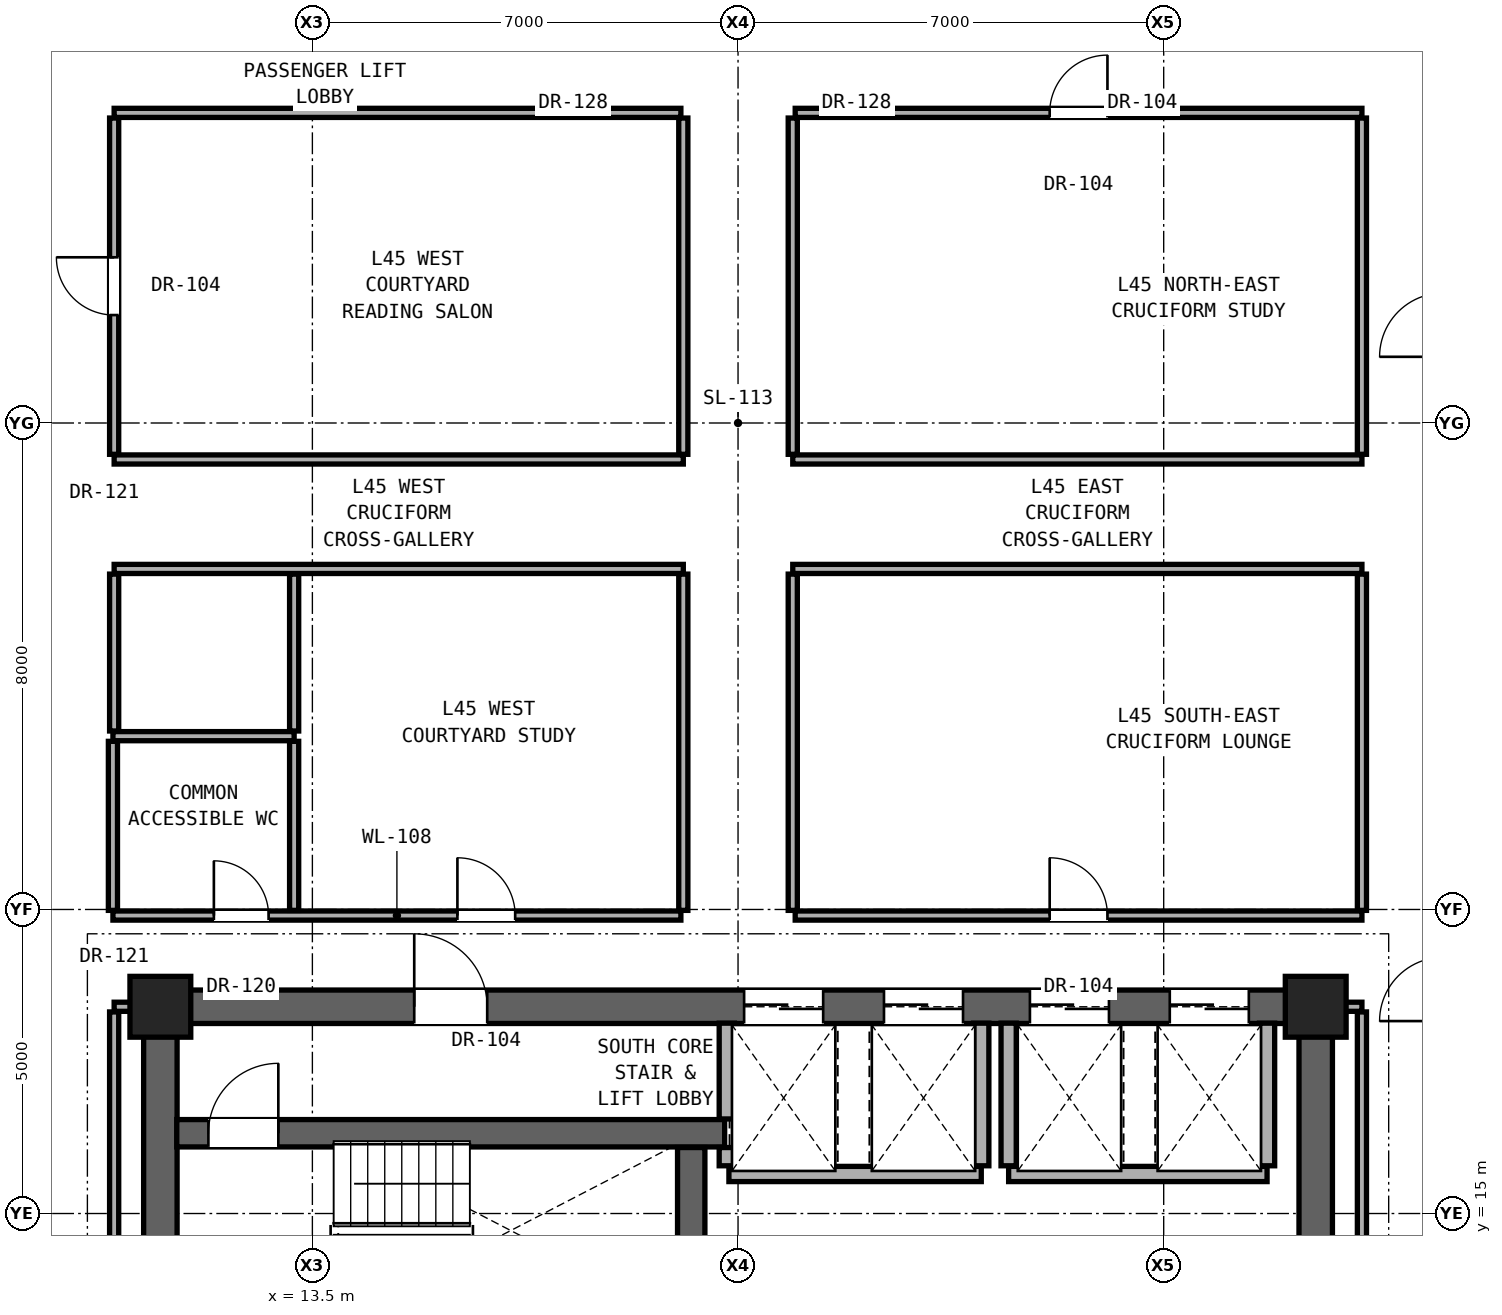
"""IFC4 building model, lengths in metres.
Left out: names, types, materials, properties, quantities, classifications, styles, units other than length and angle.
Written with IfcOpenShell. Run it as: python <this file> out.ifc"""

import sys

from ifc_helpers import new_model, si_unit, direction, frame, frame_2d, origin, origin_2d, place, context, subcontext, project, spatial, rectangle, extrude, element, fill, save


model = new_model("IFC4")
c1 = context("Model", 3, precision=1e-05, world=origin(), true_north=direction((0.0, 1.0)))
c2 = subcontext(c1, "Body", "Model", "MODEL_VIEW")
j1 = project(units=[si_unit("LENGTHUNIT", "METRE"), si_unit("PLANEANGLEUNIT", "RADIAN")], contexts=[c1])
p1 = place(None, origin())
s1 = spatial("IfcSite", under=j1, at=p1, CompositionType="ELEMENT")
p2 = place(p1, origin())
s2 = spatial("IfcBuilding", under=s1, at=p2, CompositionType="ELEMENT")
p3 = place(p2, frame((0.0, 0.0, 160.9)))
s3 = spatial("IfcBuildingStorey", under=s2, at=p3, CompositionType="ELEMENT", Elevation=160.9)
for number, where, z_axis, x_axis in (
    (1, (11.0, 18.4, 0.0), (0.0, 0.0, 1.0), (1.0, 0.0, 0.0)),
    (2, (30.0, 18.4, 0.0), (0.0, 0.0, 1.0), (1.0, 0.0, 0.0)),
):
    element("IfcColumn", number, at=place(p3, frame(where, z_axis=z_axis, x_axis=x_axis)), inside=s3, PredefinedType="COLUMN", context=c2, shape_type="SweptSolid", body=[
        extrude(rectangle(XDim=1.0, YDim=1.0, at=origin_2d()), origin(), (0.0, 0.0, 1.0), 3.25),
    ])
for number, where, z_axis, x_axis in (
    (3, (11.0, 12.4, 0.0), (0.0, 0.0, 1.0), (0.0, 1.0, 0.0)),
    (4, (30.0, 12.4, 0.0), (0.0, 0.0, 1.0), (0.0, 1.0, 0.0)),
):
    element("IfcWall", number, at=place(p3, frame(where, z_axis=z_axis, x_axis=x_axis)), inside=s3, PredefinedType="SHEAR", context=c2, shape_type="SweptSolid", body=[
        extrude(rectangle(XDim=6.0, YDim=0.55, at=frame_2d((3.0, 0.0))), origin(), (0.0, 0.0, 1.0), 3.05),
    ])
p4 = place(p3, frame((11.0, 18.4, 0.0), z_axis=(0.0, 0.0, 1.0), x_axis=(1.0, 0.0, 0.0)))
e5 = element("IfcWall", 5, at=p4, inside=s3, PredefinedType="SHEAR", context=c2, shape_type="SweptSolid", body=[
    extrude(rectangle(XDim=19.0, YDim=0.55, at=frame_2d((9.5, 0.0))), origin(), (0.0, 0.0, 1.0), 3.05),
])
p5 = place(p4, frame((4.175, 0.0, 0.0)))
e6 = element("IfcOpeningElement", 6, at=p5, cuts=e5, PredefinedType="OPENING", context=c2, shape_type="SweptSolid", body=[
    extrude(rectangle(XDim=1.2, YDim=2.25, at=frame_2d((0.6, 1.125))), frame((0.0, 0.285, 0.0), z_axis=(0.0, -1.0, 0.0), x_axis=(1.0, 0.0, 0.0)), (0.0, 0.0, 1.0), 0.57),
])
p6 = place(p4, frame((9.6, 0.0, 0.0)))
e7 = element("IfcOpeningElement", 7, at=p6, cuts=e5, PredefinedType="OPENING", context=c2, shape_type="SweptSolid", body=[
    extrude(rectangle(XDim=1.3, YDim=2.3, at=frame_2d((0.65, 1.15))), frame((0.0, 0.285, 0.0), z_axis=(0.0, -1.0, 0.0), x_axis=(1.0, 0.0, 0.0)), (0.0, 0.0, 1.0), 0.57),
])
p7 = place(p4, frame((11.9, 0.0, 0.0)))
e8 = element("IfcOpeningElement", 8, at=p7, cuts=e5, PredefinedType="OPENING", context=c2, shape_type="SweptSolid", body=[
    extrude(rectangle(XDim=1.3, YDim=2.3, at=frame_2d((0.65, 1.15))), frame((0.0, 0.285, 0.0), z_axis=(0.0, -1.0, 0.0), x_axis=(1.0, 0.0, 0.0)), (0.0, 0.0, 1.0), 0.57),
])
p8 = place(p4, frame((14.3, 0.0, 0.0)))
e9 = element("IfcOpeningElement", 9, at=p8, cuts=e5, PredefinedType="OPENING", context=c2, shape_type="SweptSolid", body=[
    extrude(rectangle(XDim=1.3, YDim=2.3, at=frame_2d((0.65, 1.15))), frame((0.0, 0.285, 0.0), z_axis=(0.0, -1.0, 0.0), x_axis=(1.0, 0.0, 0.0)), (0.0, 0.0, 1.0), 0.57),
])
p9 = place(p4, frame((16.6, 0.0, 0.0)))
e10 = element("IfcOpeningElement", 10, at=p9, cuts=e5, PredefinedType="OPENING", context=c2, shape_type="SweptSolid", body=[
    extrude(rectangle(XDim=1.3, YDim=2.3, at=frame_2d((0.65, 1.15))), frame((0.0, 0.285, 0.0), z_axis=(0.0, -1.0, 0.0), x_axis=(1.0, 0.0, 0.0)), (0.0, 0.0, 1.0), 0.57),
])
p10 = place(p3, frame((20.35, 15.65, 0.0), z_axis=(0.0, 0.0, 1.0), x_axis=(1.0, 0.0, 0.0)))
e11 = element("IfcWall", 11, at=p10, inside=s3, PredefinedType="SOLIDWALL", context=c2, shape_type="SweptSolid", body=[
    extrude(rectangle(XDim=4.15, YDim=0.25, at=frame_2d((2.075, 0.0))), origin(), (0.0, 0.0, 1.0), 3.05),
])
p11 = place(p3, frame((24.95, 15.65, 0.0), z_axis=(0.0, 0.0, 1.0), x_axis=(1.0, 0.0, 0.0)))
e12 = element("IfcWall", 12, at=p11, inside=s3, PredefinedType="SOLIDWALL", context=c2, shape_type="SweptSolid", body=[
    extrude(rectangle(XDim=4.25, YDim=0.25, at=frame_2d((2.125, 0.0))), origin(), (0.0, 0.0, 1.0), 3.05),
])
p12 = place(p3, frame((11.27, 16.32, 0.0), z_axis=(0.0, 0.0, 1.0), x_axis=(1.0, 0.0, 0.0)))
e13 = element("IfcWall", 13, at=p12, inside=s3, PredefinedType="SHEAR", context=c2, shape_type="SweptSolid", body=[
    extrude(rectangle(XDim=9.01, YDim=0.45, at=frame_2d((4.505, 0.0))), origin(), (0.0, 0.0, 1.0), 3.05),
])
p13 = place(p12, frame((0.52, 0.0, 0.0)))
e14 = element("IfcOpeningElement", 14, at=p13, cuts=e13, PredefinedType="OPENING", context=c2, shape_type="SweptSolid", body=[
    extrude(rectangle(XDim=1.15, YDim=2.2, at=frame_2d((0.575, 1.1))), frame((0.0, 0.235, 0.0), z_axis=(0.0, -1.0, 0.0), x_axis=(1.0, 0.0, 0.0)), (0.0, 0.0, 1.0), 0.47),
])
for number, where, z_axis, x_axis in (
    (15, (10.24, 18.4, 0.0), (0.0, 0.0, 1.0), (1.0, 0.0, 0.0)),
    (16, (30.27, 18.4, 0.0), (0.0, 0.0, 1.0), (1.0, 0.0, 0.0)),
):
    element("IfcWall", number, at=place(p3, frame(where, z_axis=z_axis, x_axis=x_axis)), inside=s3, PredefinedType="PARTITIONING", context=c2, shape_type="SweptSolid", body=[
        extrude(rectangle(XDim=0.49, YDim=0.15, at=frame_2d((0.245, 0.0))), origin(), (0.0, 0.0, 1.0), 2.442),
    ])
p14 = place(p3, frame((10.22, 19.9, 0.0), z_axis=(0.0, 0.0, 1.0), x_axis=(1.0, 0.0, 0.0)))
e17 = element("IfcWall", 17, at=p14, inside=s3, PredefinedType="PARTITIONING", context=c2, shape_type="SweptSolid", body=[
    extrude(rectangle(XDim=9.34, YDim=0.15, at=frame_2d((4.67, 0.0))), origin(), (0.0, 0.0, 1.0), 2.186),
])
p15 = place(p14, frame((1.66, 0.0, 0.0)))
e18 = element("IfcOpeningElement", 18, at=p15, cuts=e17, PredefinedType="OPENING", context=c2, shape_type="SweptSolid", body=[
    extrude(rectangle(XDim=0.9, YDim=2.1, at=frame_2d((0.45, 1.05))), frame((0.0, 0.085, 0.0), z_axis=(0.0, -1.0, 0.0), x_axis=(1.0, 0.0, 0.0)), (0.0, 0.0, 1.0), 0.17),
])
p16 = place(p14, frame((5.665, 0.0, 0.0)))
e19 = element("IfcOpeningElement", 19, at=p16, cuts=e17, PredefinedType="OPENING", context=c2, shape_type="SweptSolid", body=[
    extrude(rectangle(XDim=0.95, YDim=2.15, at=frame_2d((0.475, 1.075))), frame((0.0, 0.085, 0.0), z_axis=(0.0, -1.0, 0.0), x_axis=(1.0, 0.0, 0.0)), (0.0, 0.0, 1.0), 0.17),
])
p17 = place(p3, frame((21.44, 19.9, 0.0), z_axis=(0.0, 0.0, 1.0), x_axis=(1.0, 0.0, 0.0)))
e20 = element("IfcWall", 20, at=p17, inside=s3, PredefinedType="PARTITIONING", context=c2, shape_type="SweptSolid", body=[
    extrude(rectangle(XDim=9.32, YDim=0.15, at=frame_2d((4.66, 0.0))), origin(), (0.0, 0.0, 1.0), 2.186),
])
p18 = place(p17, frame((4.185, 0.0, 0.0)))
e21 = element("IfcOpeningElement", 21, at=p18, cuts=e20, PredefinedType="OPENING", context=c2, shape_type="SweptSolid", body=[
    extrude(rectangle(XDim=0.95, YDim=2.15, at=frame_2d((0.475, 1.075))), frame((0.0, 0.085, 0.0), z_axis=(0.0, -1.0, 0.0), x_axis=(1.0, 0.0, 0.0)), (0.0, 0.0, 1.0), 0.17),
])
p19 = place(p3, frame((10.22, 22.85, 0.0), z_axis=(0.0, 0.0, 1.0), x_axis=(1.0, 0.0, 0.0)))
e22 = element("IfcWall", 22, at=p19, inside=s3, PredefinedType="PARTITIONING", context=c2, shape_type="SweptSolid", body=[
    extrude(rectangle(XDim=2.98, YDim=0.15, at=frame_2d((1.49, 0.0))), origin(), (0.0, 0.0, 1.0), 2.186),
])
for number, where, z_axis, x_axis in (
    (23, (10.24, 25.6, 0.0), (0.0, 0.0, 1.0), (1.0, 0.0, 0.0)),
    (24, (21.4, 25.6, 0.0), (0.0, 0.0, 1.0), (1.0, 0.0, 0.0)),
    (25, (10.24, 27.4, 0.0), (0.0, 0.0, 1.0), (1.0, 0.0, 0.0)),
    (26, (21.4, 27.4, 0.0), (0.0, 0.0, 1.0), (1.0, 0.0, 0.0)),
):
    element("IfcWall", number, at=place(p3, frame(where, z_axis=z_axis, x_axis=x_axis)), inside=s3, PredefinedType="PARTITIONING", context=c2, shape_type="SweptSolid", body=[
        extrude(rectangle(XDim=9.36, YDim=0.15, at=frame_2d((4.68, 0.0))), origin(), (0.0, 0.0, 1.0), 2.186),
    ])
p20 = place(p3, frame((10.24, 33.1, 0.0), z_axis=(0.0, 0.0, 1.0), x_axis=(1.0, 0.0, 0.0)))
e27 = element("IfcWall", 27, at=p20, inside=s3, PredefinedType="PARTITIONING", context=c2, shape_type="SweptSolid", body=[
    extrude(rectangle(XDim=9.32, YDim=0.15, at=frame_2d((4.66, 0.0))), origin(), (0.0, 0.0, 1.0), 2.186),
])
p21 = place(p3, frame((21.44, 33.1, 0.0), z_axis=(0.0, 0.0, 1.0), x_axis=(1.0, 0.0, 0.0)))
e28 = element("IfcWall", 28, at=p21, inside=s3, PredefinedType="PARTITIONING", context=c2, shape_type="SweptSolid", body=[
    extrude(rectangle(XDim=9.32, YDim=0.15, at=frame_2d((4.66, 0.0))), origin(), (0.0, 0.0, 1.0), 2.186),
])
p22 = place(p21, frame((4.185, 0.0, 0.0)))
e29 = element("IfcOpeningElement", 29, at=p22, cuts=e28, PredefinedType="OPENING", context=c2, shape_type="SweptSolid", body=[
    extrude(rectangle(XDim=0.95, YDim=2.15, at=frame_2d((0.475, 1.075))), frame((0.0, 0.085, 0.0), z_axis=(0.0, -1.0, 0.0), x_axis=(1.0, 0.0, 0.0)), (0.0, 0.0, 1.0), 0.17),
])
p23 = place(p3, frame((10.22, 19.985, 0.0), z_axis=(0.0, 0.0, 1.0), x_axis=(0.0, 1.0, 0.0)))
e30 = element("IfcWall", 30, at=p23, inside=s3, PredefinedType="PARTITIONING", context=c2, shape_type="SweptSolid", body=[
    extrude(rectangle(XDim=2.78, YDim=0.15, at=frame_2d((1.39, 0.0))), origin(), (0.0, 0.0, 1.0), 3.05),
])
p24 = place(p3, frame((10.24, 12.335, 0.0), z_axis=(0.0, 0.0, 1.0), x_axis=(0.0, 1.0, 0.0)))
e31 = element("IfcWall", 31, at=p24, inside=s3, PredefinedType="PARTITIONING", context=c2, shape_type="SweptSolid", body=[
    extrude(rectangle(XDim=5.98, YDim=0.15, at=frame_2d((2.99, 0.0))), origin(), (0.0, 0.0, 1.0), 2.442),
])
p25 = place(p3, frame((10.24, 22.935, 0.0), z_axis=(0.0, 0.0, 1.0), x_axis=(0.0, 1.0, 0.0)))
e32 = element("IfcWall", 32, at=p25, inside=s3, PredefinedType="PARTITIONING", context=c2, shape_type="SweptSolid", body=[
    extrude(rectangle(XDim=2.58, YDim=0.15, at=frame_2d((1.29, 0.0))), origin(), (0.0, 0.0, 1.0), 2.346),
])
p26 = place(p3, frame((10.24, 27.485, 0.0), z_axis=(0.0, 0.0, 1.0), x_axis=(0.0, 1.0, 0.0)))
e33 = element("IfcWall", 33, at=p26, inside=s3, PredefinedType="PARTITIONING", context=c2, shape_type="SweptSolid", body=[
    extrude(rectangle(XDim=5.53, YDim=0.15, at=frame_2d((2.765, 0.0))), origin(), (0.0, 0.0, 1.0), 2.346),
])
p27 = place(p26, frame((2.29, 0.0, 0.0)))
e34 = element("IfcOpeningElement", 34, at=p27, cuts=e33, PredefinedType="OPENING", context=c2, shape_type="SweptSolid", body=[
    extrude(rectangle(XDim=0.95, YDim=2.15, at=frame_2d((0.475, 1.075))), frame((0.0, 0.085, 0.0), z_axis=(0.0, -1.0, 0.0), x_axis=(1.0, 0.0, 0.0)), (0.0, 0.0, 1.0), 0.17),
])
p28 = place(p3, frame((13.2, 19.985, 0.0), z_axis=(0.0, 0.0, 1.0), x_axis=(0.0, 1.0, 0.0)))
e35 = element("IfcWall", 35, at=p28, inside=s3, PredefinedType="PARTITIONING", context=c2, shape_type="SweptSolid", body=[
    extrude(rectangle(XDim=2.78, YDim=0.15, at=frame_2d((1.39, 0.0))), origin(), (0.0, 0.0, 1.0), 3.05),
])
p29 = place(p3, frame((13.2, 22.935, 0.0), z_axis=(0.0, 0.0, 1.0), x_axis=(0.0, 1.0, 0.0)))
e36 = element("IfcWall", 36, at=p29, inside=s3, PredefinedType="PARTITIONING", context=c2, shape_type="SweptSolid", body=[
    extrude(rectangle(XDim=2.58, YDim=0.15, at=frame_2d((1.29, 0.0))), origin(), (0.0, 0.0, 1.0), 2.186),
])
for number, where, z_axis, x_axis in (
    (37, (19.6, 19.985, 0.0), (0.0, 0.0, 1.0), (0.0, 1.0, 0.0)),
    (38, (19.6, 27.485, 0.0), (0.0, 0.0, 1.0), (0.0, 1.0, 0.0)),
):
    element("IfcWall", number, at=place(p3, frame(where, z_axis=z_axis, x_axis=x_axis)), inside=s3, PredefinedType="PARTITIONING", context=c2, shape_type="SweptSolid", body=[
        extrude(rectangle(XDim=5.53, YDim=0.15, at=frame_2d((2.765, 0.0))), origin(), (0.0, 0.0, 1.0), 2.186),
    ])
p30 = place(p3, frame((19.73, 13.355, 0.0), z_axis=(0.0, 0.0, 1.0), x_axis=(0.0, 1.0, 0.0)))
e39 = element("IfcWall", 39, at=p30, inside=s3, PredefinedType="SHEAR", context=c2, shape_type="SweptSolid", body=[
    extrude(rectangle(XDim=2.73, YDim=0.45, at=frame_2d((1.365, 0.0))), origin(), (0.0, 0.0, 1.0), 3.05),
])
p31 = place(p3, frame((20.315, 15.785, 0.0), z_axis=(0.0, 0.0, 1.0), x_axis=(0.0, 1.0, 0.0)))
e40 = element("IfcWall", 40, at=p31, inside=s3, PredefinedType="SOLIDWALL", context=c2, shape_type="SweptSolid", body=[
    extrude(rectangle(XDim=0.3, YDim=0.25, at=frame_2d((0.15, 0.0))), origin(), (0.0, 0.0, 1.0), 3.05),
])
p32 = place(p3, frame((20.315, 16.555, 0.0), z_axis=(0.0, 0.0, 1.0), x_axis=(0.0, 1.0, 0.0)))
e41 = element("IfcWall", 41, at=p32, inside=s3, PredefinedType="SOLIDWALL", context=c2, shape_type="SweptSolid", body=[
    extrude(rectangle(XDim=1.575, YDim=0.25, at=frame_2d((0.788, 0.0))), origin(), (0.0, 0.0, 1.0), 3.05),
])
for number, where, z_axis, x_axis in (
    (42, (21.4, 19.985, 0.0), (0.0, 0.0, 1.0), (0.0, 1.0, 0.0)),
    (43, (21.4, 27.485, 0.0), (0.0, 0.0, 1.0), (0.0, 1.0, 0.0)),
):
    element("IfcWall", number, at=place(p3, frame(where, z_axis=z_axis, x_axis=x_axis)), inside=s3, PredefinedType="PARTITIONING", context=c2, shape_type="SweptSolid", body=[
        extrude(rectangle(XDim=5.53, YDim=0.15, at=frame_2d((2.765, 0.0))), origin(), (0.0, 0.0, 1.0), 2.186),
    ])
for number, where, z_axis, x_axis in (
    (44, (24.5, 15.785, 0.0), (0.0, 0.0, 1.0), (0.0, 1.0, 0.0)),
    (45, (24.95, 15.785, 0.0), (0.0, 0.0, 1.0), (0.0, 1.0, 0.0)),
    (46, (29.2, 15.785, 0.0), (0.0, 0.0, 1.0), (0.0, 1.0, 0.0)),
):
    element("IfcWall", number, at=place(p3, frame(where, z_axis=z_axis, x_axis=x_axis)), inside=s3, PredefinedType="SOLIDWALL", context=c2, shape_type="SweptSolid", body=[
        extrude(rectangle(XDim=2.345, YDim=0.25, at=frame_2d((1.172, 0.0))), origin(), (0.0, 0.0, 1.0), 3.05),
    ])
p33 = place(p3, frame((30.76, 12.335, 0.0), z_axis=(0.0, 0.0, 1.0), x_axis=(0.0, 1.0, 0.0)))
e47 = element("IfcWall", 47, at=p33, inside=s3, PredefinedType="PARTITIONING", context=c2, shape_type="SweptSolid", body=[
    extrude(rectangle(XDim=5.98, YDim=0.15, at=frame_2d((2.99, 0.0))), origin(), (0.0, 0.0, 1.0), 2.442),
])
for number, where, z_axis, x_axis in (
    (48, (30.76, 19.985, 0.0), (0.0, 0.0, 1.0), (0.0, 1.0, 0.0)),
    (49, (30.76, 27.485, 0.0), (0.0, 0.0, 1.0), (0.0, 1.0, 0.0)),
):
    element("IfcWall", number, at=place(p3, frame(where, z_axis=z_axis, x_axis=x_axis)), inside=s3, PredefinedType="PARTITIONING", context=c2, shape_type="SweptSolid", body=[
        extrude(rectangle(XDim=5.53, YDim=0.15, at=frame_2d((2.765, 0.0))), origin(), (0.0, 0.0, 1.0), 2.346),
    ])
p34 = place(p5, origin())
e50 = element("IfcDoor", 50, at=p34, inside=s3, OperationType="SINGLE_SWING_LEFT", PredefinedType="DOOR", context=c2, shape_type="SweptSolid", body=[
    extrude(rectangle(XDim=1.2, YDim=2.25, at=frame_2d((0.6, 1.125))), frame((0.0, 0.025, 0.0), z_axis=(0.0, -1.0, 0.0), x_axis=(1.0, 0.0, 0.0)), (0.0, 0.0, 1.0), 0.05),
])
fill(e6, e50)
p35 = place(p13, origin())
e51 = element("IfcDoor", 51, at=p35, inside=s3, OperationType="SINGLE_SWING_RIGHT", PredefinedType="DOOR", context=c2, shape_type="SweptSolid", body=[
    extrude(rectangle(XDim=1.15, YDim=2.2, at=frame_2d((0.575, 1.1))), frame((0.0, 0.025, 0.0), z_axis=(0.0, -1.0, 0.0), x_axis=(1.0, 0.0, 0.0)), (0.0, 0.0, 1.0), 0.05),
])
fill(e14, e51)
p36 = place(p15, origin())
e52 = element("IfcDoor", 52, at=p36, inside=s3, OperationType="SINGLE_SWING_LEFT", PredefinedType="DOOR", context=c2, shape_type="SweptSolid", body=[
    extrude(rectangle(XDim=0.9, YDim=2.1, at=frame_2d((0.45, 1.05))), frame((0.0, 0.025, 0.0), z_axis=(0.0, -1.0, 0.0), x_axis=(1.0, 0.0, 0.0)), (0.0, 0.0, 1.0), 0.05),
])
fill(e18, e52)
p37 = place(p16, origin())
e53 = element("IfcDoor", 53, at=p37, inside=s3, OperationType="SINGLE_SWING_LEFT", PredefinedType="DOOR", context=c2, shape_type="SweptSolid", body=[
    extrude(rectangle(XDim=0.95, YDim=2.15, at=frame_2d((0.475, 1.075))), frame((0.0, 0.025, 0.0), z_axis=(0.0, -1.0, 0.0), x_axis=(1.0, 0.0, 0.0)), (0.0, 0.0, 1.0), 0.05),
])
fill(e19, e53)
p38 = place(p27, origin())
e54 = element("IfcDoor", 54, at=p38, inside=s3, OperationType="SINGLE_SWING_RIGHT", PredefinedType="DOOR", context=c2, shape_type="SweptSolid", body=[
    extrude(rectangle(XDim=0.95, YDim=2.15, at=frame_2d((0.475, 1.075))), frame((0.0, 0.025, 0.0), z_axis=(0.0, -1.0, 0.0), x_axis=(1.0, 0.0, 0.0)), (0.0, 0.0, 1.0), 0.05),
])
fill(e34, e54)
p39 = place(p18, origin())
e55 = element("IfcDoor", 55, at=p39, inside=s3, OperationType="SINGLE_SWING_LEFT", PredefinedType="DOOR", context=c2, shape_type="SweptSolid", body=[
    extrude(rectangle(XDim=0.95, YDim=2.15, at=frame_2d((0.475, 1.075))), frame((0.0, 0.025, 0.0), z_axis=(0.0, -1.0, 0.0), x_axis=(1.0, 0.0, 0.0)), (0.0, 0.0, 1.0), 0.05),
])
fill(e21, e55)
p40 = place(p22, origin())
e56 = element("IfcDoor", 56, at=p40, inside=s3, OperationType="SINGLE_SWING_RIGHT", PredefinedType="DOOR", context=c2, shape_type="SweptSolid", body=[
    extrude(rectangle(XDim=0.95, YDim=2.15, at=frame_2d((0.475, 1.075))), frame((0.0, 0.025, 0.0), z_axis=(0.0, -1.0, 0.0), x_axis=(1.0, 0.0, 0.0)), (0.0, 0.0, 1.0), 0.05),
])
fill(e29, e56)
p41 = place(p6, origin())
e57 = element("IfcDoor", 57, at=p41, inside=s3, OperationType="DOUBLE_DOOR_SLIDING", PredefinedType="DOOR", context=c2, shape_type="SweptSolid", body=[
    extrude(rectangle(XDim=1.3, YDim=2.3, at=frame_2d((0.65, 1.15))), frame((0.0, 0.025, 0.0), z_axis=(0.0, -1.0, 0.0), x_axis=(1.0, 0.0, 0.0)), (0.0, 0.0, 1.0), 0.05),
])
fill(e7, e57)
p42 = place(p7, origin())
e58 = element("IfcDoor", 58, at=p42, inside=s3, OperationType="DOUBLE_DOOR_SLIDING", PredefinedType="DOOR", context=c2, shape_type="SweptSolid", body=[
    extrude(rectangle(XDim=1.3, YDim=2.3, at=frame_2d((0.65, 1.15))), frame((0.0, 0.025, 0.0), z_axis=(0.0, -1.0, 0.0), x_axis=(1.0, 0.0, 0.0)), (0.0, 0.0, 1.0), 0.05),
])
fill(e8, e58)
p43 = place(p8, origin())
e59 = element("IfcDoor", 59, at=p43, inside=s3, OperationType="DOUBLE_DOOR_SLIDING", PredefinedType="DOOR", context=c2, shape_type="SweptSolid", body=[
    extrude(rectangle(XDim=1.3, YDim=2.3, at=frame_2d((0.65, 1.15))), frame((0.0, 0.025, 0.0), z_axis=(0.0, -1.0, 0.0), x_axis=(1.0, 0.0, 0.0)), (0.0, 0.0, 1.0), 0.05),
])
fill(e9, e59)
p44 = place(p9, origin())
e60 = element("IfcDoor", 60, at=p44, inside=s3, OperationType="DOUBLE_DOOR_SLIDING", PredefinedType="DOOR", context=c2, shape_type="SweptSolid", body=[
    extrude(rectangle(XDim=1.3, YDim=2.3, at=frame_2d((0.65, 1.15))), frame((0.0, 0.025, 0.0), z_axis=(0.0, -1.0, 0.0), x_axis=(1.0, 0.0, 0.0)), (0.0, 0.0, 1.0), 0.05),
])
fill(e10, e60)
save(model, sys.argv[1])
